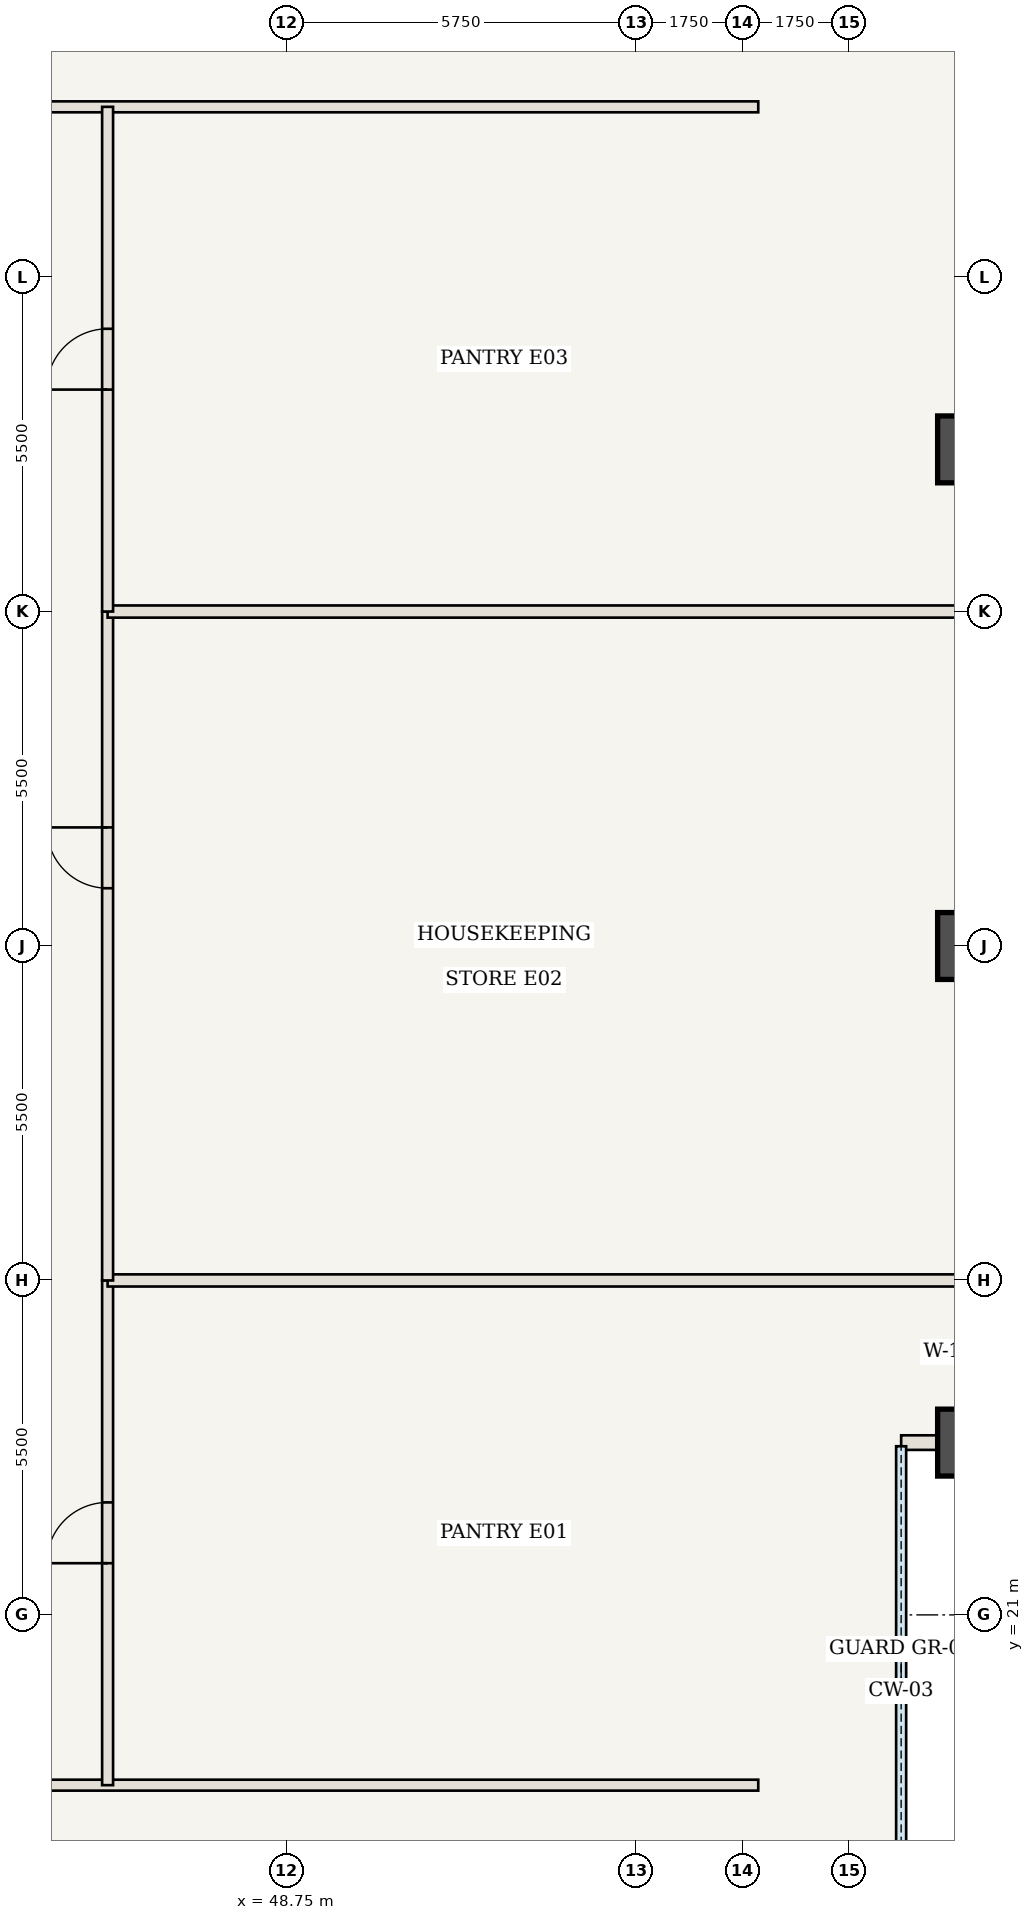
"""IFC4 building model, lengths in metres.
Left out: names, types, materials, properties, quantities, classifications, styles, units other than length and angle.
Written with IfcOpenShell. Run it as: python <this file> out.ifc"""

import sys

from ifc_helpers import new_model, si_unit, direction, frame, frame_2d, origin, origin_2d, place, context, subcontext, project, spatial, rectangle, extrude, element, fill, save


model = new_model("IFC4")
c1 = context("Model", 3, precision=1e-05, world=origin(), true_north=direction((0.0, 1.0)))
c2 = subcontext(c1, "Body", "Model", "MODEL_VIEW")
j1 = project(units=[si_unit("LENGTHUNIT", "METRE"), si_unit("PLANEANGLEUNIT", "RADIAN")], contexts=[c1])
p1 = place(None, origin())
s1 = spatial("IfcSite", under=j1, at=p1, CompositionType="ELEMENT")
p2 = place(p1, origin())
s2 = spatial("IfcBuilding", under=s1, at=p2, CompositionType="ELEMENT")
p3 = place(p2, frame((0.0, 0.0, 92.75)))
s3 = spatial("IfcBuildingStorey", under=s2, at=p3, CompositionType="ELEMENT", Elevation=92.75)
for number, where, z_axis, x_axis in (
    (1, (60.0, 23.833, 0.0), (0.0, 0.0, 1.0), (1.0, 0.0, 0.0)),
    (2, (60.0, 32.0, 0.0), (0.0, 0.0, 1.0), (1.0, 0.0, 0.0)),
    (3, (60.0, 40.167, 0.0), (0.0, 0.0, 1.0), (1.0, 0.0, 0.0)),
):
    element("IfcColumn", number, at=place(p3, frame(where, z_axis=z_axis, x_axis=x_axis)), inside=s3, PredefinedType="COLUMN", context=c2, shape_type="SweptSolid", body=[
        extrude(rectangle(XDim=1.1, YDim=1.1, at=origin_2d()), origin(), (0.0, 0.0, 1.0), 3.5),
    ])
p4 = place(p3, frame((33.8, 18.2, 0.0), z_axis=(0.0, 0.0, 1.0), x_axis=(1.0, 0.0, 0.0)))
e4 = element("IfcWall", 4, at=p4, inside=s3, PredefinedType="STANDARD", context=c2, shape_type="SweptSolid", body=[
    extrude(rectangle(XDim=22.7, YDim=0.18, at=frame_2d((11.35, 0.0))), origin(), (0.0, 0.0, 1.0), 3.28),
])
p5 = place(p4, frame((5.475, 0.0, 0.0)))
e5 = element("IfcOpeningElement", 5, at=p5, cuts=e4, PredefinedType="OPENING", context=c2, shape_type="SweptSolid", body=[
    extrude(rectangle(XDim=1.0, YDim=2.15, at=frame_2d((0.5, 1.075))), frame((0.0, 0.1, 0.0), z_axis=(0.0, -1.0, 0.0), x_axis=(1.0, 0.0, 0.0)), (0.0, 0.0, 1.0), 0.2),
])
p6 = place(p3, frame((38.5, 45.8, 0.0), z_axis=(0.0, 0.0, 1.0), x_axis=(1.0, 0.0, 0.0)))
e6 = element("IfcWall", 6, at=p6, inside=s3, PredefinedType="STANDARD", context=c2, shape_type="SweptSolid", body=[
    extrude(rectangle(XDim=18.0, YDim=0.18, at=frame_2d((9.0, 0.0))), origin(), (0.0, 0.0, 1.0), 3.28),
])
p7 = place(p6, frame((4.575, 0.0, 0.0)))
e7 = element("IfcOpeningElement", 7, at=p7, cuts=e6, PredefinedType="OPENING", context=c2, shape_type="SweptSolid", body=[
    extrude(rectangle(XDim=1.0, YDim=2.15, at=frame_2d((0.5, 1.075))), frame((0.0, 0.1, 0.0), z_axis=(0.0, -1.0, 0.0), x_axis=(1.0, 0.0, 0.0)), (0.0, 0.0, 1.0), 0.2),
])
p8 = place(p3, frame((45.8, 18.2, 0.0), z_axis=(0.0, 0.0, 1.0), x_axis=(0.0, 1.0, 0.0)))
e8 = element("IfcWall", 8, at=p8, inside=s3, PredefinedType="STANDARD", context=c2, shape_type="SweptSolid", body=[
    extrude(rectangle(XDim=8.3, YDim=0.18, at=frame_2d((4.15, 0.0))), origin(), (0.0, 0.0, 1.0), 3.28),
])
p9 = place(p8, frame((3.65, 0.0, 0.0)))
e9 = element("IfcOpeningElement", 9, at=p9, cuts=e8, PredefinedType="OPENING", context=c2, shape_type="SweptSolid", body=[
    extrude(rectangle(XDim=1.0, YDim=2.15, at=frame_2d((0.5, 1.075))), frame((0.0, 0.1, 0.0), z_axis=(0.0, -1.0, 0.0), x_axis=(1.0, 0.0, 0.0)), (0.0, 0.0, 1.0), 0.2),
])
p10 = place(p3, frame((45.8, 26.5, 0.0), z_axis=(0.0, 0.0, 1.0), x_axis=(1.0, 0.0, 0.0)))
e10 = element("IfcWall", 10, at=p10, inside=s3, PredefinedType="STANDARD", context=c2, shape_type="SweptSolid", body=[
    extrude(rectangle(XDim=14.14, YDim=0.2, at=frame_2d((7.07, 0.0))), origin(), (0.0, 0.0, 1.0), 3.28),
])
p11 = place(p3, frame((45.8, 26.5, 0.0), z_axis=(0.0, 0.0, 1.0), x_axis=(0.0, 1.0, 0.0)))
e11 = element("IfcWall", 11, at=p11, inside=s3, PredefinedType="STANDARD", context=c2, shape_type="SweptSolid", body=[
    extrude(rectangle(XDim=11.0, YDim=0.18, at=frame_2d((5.5, 0.0))), origin(), (0.0, 0.0, 1.0), 3.28),
])
p12 = place(p11, frame((6.45, 0.0, 0.0)))
e12 = element("IfcOpeningElement", 12, at=p12, cuts=e11, PredefinedType="OPENING", context=c2, shape_type="SweptSolid", body=[
    extrude(rectangle(XDim=1.0, YDim=2.15, at=frame_2d((0.5, 1.075))), frame((0.0, 0.1, 0.0), z_axis=(0.0, -1.0, 0.0), x_axis=(1.0, 0.0, 0.0)), (0.0, 0.0, 1.0), 0.2),
])
p13 = place(p3, frame((45.8, 37.5, 0.0), z_axis=(0.0, 0.0, 1.0), x_axis=(1.0, 0.0, 0.0)))
e13 = element("IfcWall", 13, at=p13, inside=s3, PredefinedType="STANDARD", context=c2, shape_type="SweptSolid", body=[
    extrude(rectangle(XDim=14.14, YDim=0.2, at=frame_2d((7.07, 0.0))), origin(), (0.0, 0.0, 1.0), 3.28),
])
p14 = place(p3, frame((45.8, 37.5, 0.0), z_axis=(0.0, 0.0, 1.0), x_axis=(0.0, 1.0, 0.0)))
e14 = element("IfcWall", 14, at=p14, inside=s3, PredefinedType="STANDARD", context=c2, shape_type="SweptSolid", body=[
    extrude(rectangle(XDim=8.3, YDim=0.18, at=frame_2d((4.15, 0.0))), origin(), (0.0, 0.0, 1.0), 3.28),
])
p15 = place(p14, frame((3.65, 0.0, 0.0)))
e15 = element("IfcOpeningElement", 15, at=p15, cuts=e14, PredefinedType="OPENING", context=c2, shape_type="SweptSolid", body=[
    extrude(rectangle(XDim=1.0, YDim=2.15, at=frame_2d((0.5, 1.075))), frame((0.0, 0.1, 0.0), z_axis=(0.0, -1.0, 0.0), x_axis=(1.0, 0.0, 0.0)), (0.0, 0.0, 1.0), 0.2),
])
p16 = place(p3, frame((60.0, 23.833, 0.0), z_axis=(0.0, 0.0, 1.0), x_axis=(-1.0, 0.0, 0.0)))
e16 = element("IfcWall", 16, at=p16, inside=s3, PredefinedType="USERDEFINED", context=c2, shape_type="SweptSolid", body=[
    extrude(rectangle(XDim=1.15, YDim=0.24, at=frame_2d((0.575, 0.0))), origin(), (0.0, 0.0, 1.0), 2.48),
])
p17 = place(p9, origin())
e17 = element("IfcDoor", 17, at=p17, inside=s3, OperationType="SINGLE_SWING_LEFT", PredefinedType="DOOR", context=c2, shape_type="SweptSolid", body=[
    extrude(rectangle(XDim=1.0, YDim=2.15, at=frame_2d((0.5, 1.075))), frame((0.0, 0.025, 0.0), z_axis=(0.0, -1.0, 0.0), x_axis=(1.0, 0.0, 0.0)), (0.0, 0.0, 1.0), 0.05),
])
fill(e9, e17)
p18 = place(p12, origin())
e18 = element("IfcDoor", 18, at=p18, inside=s3, OperationType="SINGLE_SWING_RIGHT", PredefinedType="DOOR", context=c2, shape_type="SweptSolid", body=[
    extrude(rectangle(XDim=1.0, YDim=2.15, at=frame_2d((0.5, 1.075))), frame((0.0, 0.025, 0.0), z_axis=(0.0, -1.0, 0.0), x_axis=(1.0, 0.0, 0.0)), (0.0, 0.0, 1.0), 0.05),
])
fill(e12, e18)
p19 = place(p15, origin())
e19 = element("IfcDoor", 19, at=p19, inside=s3, OperationType="SINGLE_SWING_LEFT", PredefinedType="DOOR", context=c2, shape_type="SweptSolid", body=[
    extrude(rectangle(XDim=1.0, YDim=2.15, at=frame_2d((0.5, 1.075))), frame((0.0, 0.025, 0.0), z_axis=(0.0, -1.0, 0.0), x_axis=(1.0, 0.0, 0.0)), (0.0, 0.0, 1.0), 0.05),
])
fill(e15, e19)
save(model, sys.argv[1])
